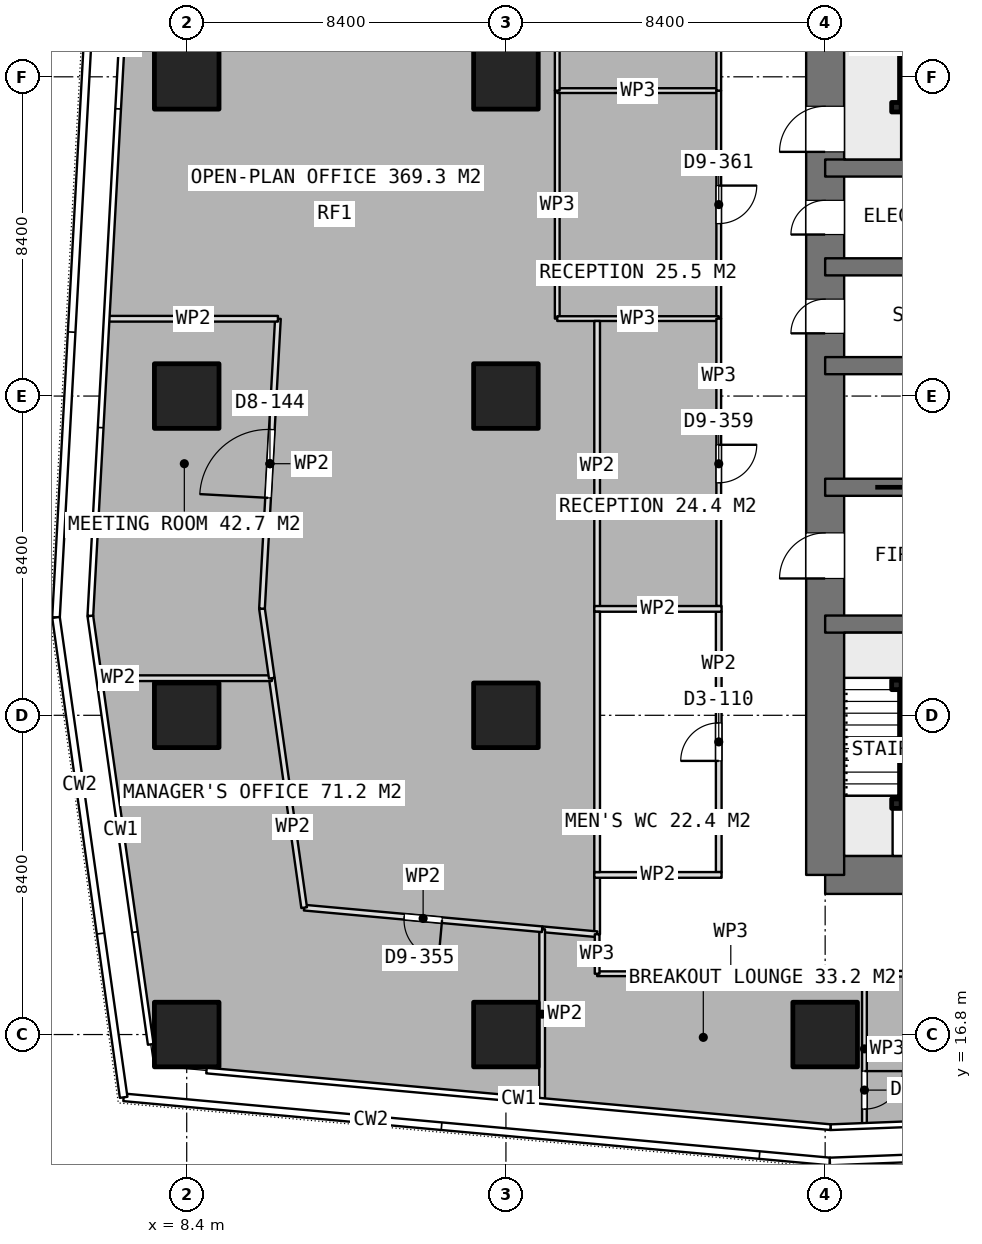
"""IFC4 building model, lengths in metres.
Left out: names, types, materials, properties, quantities, classifications, styles, units other than length and angle.
Written with IfcOpenShell. Run it as: python <this file> out.ifc"""

import sys

from ifc_helpers import new_model, si_unit, direction, frame, frame_2d, origin, origin_2d, place, context, subcontext, project, spatial, rectangle, extrude, element, fill, save


model = new_model("IFC4")
c1 = context("Model", 3, precision=1e-05, world=origin(), true_north=direction((0.0, 1.0)))
c2 = subcontext(c1, "Body", "Model", "MODEL_VIEW")
j1 = project(units=[si_unit("LENGTHUNIT", "METRE"), si_unit("PLANEANGLEUNIT", "RADIAN")], contexts=[c1])
p1 = place(None, origin())
s1 = spatial("IfcSite", under=j1, at=p1, CompositionType="ELEMENT")
p2 = place(p1, origin())
s2 = spatial("IfcBuilding", under=s1, at=p2, CompositionType="ELEMENT")
p3 = place(p2, frame((0.0, 0.0, 106.55)))
s3 = spatial("IfcBuildingStorey", under=s2, at=p3, CompositionType="ELEMENT", Elevation=106.55)
p4 = place(p3, frame((25.2, 21.0, 0.0), z_axis=(0.0, 0.0, 1.0), x_axis=(1.0, 0.0, 0.0)))
e1 = element("IfcWall", 1, at=p4, inside=s3, PredefinedType="SHEAR", context=c2, shape_type="SweptSolid", body=[
    extrude(rectangle(XDim=10.4, YDim=1.0, at=frame_2d((5.2, 0.0))), origin(), (0.0, 0.0, 1.0), 3.75),
])
p5 = place(p3, frame((25.2, 21.0, 0.0), z_axis=(0.0, 0.0, 1.0), x_axis=(0.0, 1.0, 0.0)))
e2 = element("IfcWall", 2, at=p5, inside=s3, PredefinedType="SHEAR", context=c2, shape_type="SweptSolid", body=[
    extrude(rectangle(XDim=25.2, YDim=1.0, at=frame_2d((12.6, 0.0))), origin(), (0.0, 0.0, 1.0), 3.75),
])
p6 = place(p5, frame((7.8, 0.0, 0.0)))
e3 = element("IfcOpeningElement", 3, at=p6, cuts=e2, PredefinedType="OPENING", context=c2, shape_type="SweptSolid", body=[
    extrude(rectangle(XDim=1.2, YDim=2.1, at=frame_2d((0.6, 1.05))), frame((0.0, 0.51, 0.0), z_axis=(0.0, -1.0, 0.0), x_axis=(1.0, 0.0, 0.0)), (0.0, 0.0, 1.0), 1.02),
])
p7 = place(p5, frame((14.25, 0.0, 0.0)))
e4 = element("IfcOpeningElement", 4, at=p7, cuts=e2, PredefinedType="OPENING", context=c2, shape_type="SweptSolid", body=[
    extrude(rectangle(XDim=0.9, YDim=2.1, at=frame_2d((0.45, 1.05))), frame((0.0, 0.51, 0.0), z_axis=(0.0, -1.0, 0.0), x_axis=(1.0, 0.0, 0.0)), (0.0, 0.0, 1.0), 1.02),
])
p8 = place(p5, frame((16.85, 0.0, 0.0)))
e5 = element("IfcOpeningElement", 5, at=p8, cuts=e2, PredefinedType="OPENING", context=c2, shape_type="SweptSolid", body=[
    extrude(rectangle(XDim=0.9, YDim=2.1, at=frame_2d((0.45, 1.05))), frame((0.0, 0.51, 0.0), z_axis=(0.0, -1.0, 0.0), x_axis=(1.0, 0.0, 0.0)), (0.0, 0.0, 1.0), 1.02),
])
p9 = place(p5, frame((19.025, 0.0, 0.0)))
e6 = element("IfcOpeningElement", 6, at=p9, cuts=e2, PredefinedType="OPENING", context=c2, shape_type="SweptSolid", body=[
    extrude(rectangle(XDim=1.2, YDim=2.1, at=frame_2d((0.6, 1.05))), frame((0.0, 0.51, 0.0), z_axis=(0.0, -1.0, 0.0), x_axis=(1.0, 0.0, 0.0)), (0.0, 0.0, 1.0), 1.02),
])
p10 = place(p3, frame((25.2, 27.6, 0.0), z_axis=(0.0, 0.0, 1.0), x_axis=(1.0, 0.0, 0.0)))
e7 = element("IfcWall", 7, at=p10, inside=s3, PredefinedType="SHEAR", context=c2, shape_type="SweptSolid", body=[
    extrude(rectangle(XDim=6.6, YDim=0.45, at=frame_2d((3.3, 0.0))), origin(), (0.0, 0.0, 1.0), 3.75),
])
p11 = place(p10, frame((4.975, 0.0, 0.0)))
e8 = element("IfcOpeningElement", 8, at=p11, cuts=e7, PredefinedType="OPENING", context=c2, shape_type="SweptSolid", body=[
    extrude(rectangle(XDim=1.2, YDim=2.1, at=frame_2d((0.6, 1.05))), frame((0.0, 0.235, 0.0), z_axis=(0.0, -1.0, 0.0), x_axis=(1.0, 0.0, 0.0)), (0.0, 0.0, 1.0), 0.47),
])
p12 = place(p3, frame((25.2, 31.2, 0.0), z_axis=(0.0, 0.0, 1.0), x_axis=(1.0, 0.0, 0.0)))
e9 = element("IfcWall", 9, at=p12, inside=s3, PredefinedType="SHEAR", context=c2, shape_type="SweptSolid", body=[
    extrude(rectangle(XDim=6.6, YDim=0.45, at=frame_2d((3.3, 0.0))), origin(), (0.0, 0.0, 1.0), 3.75),
])
p13 = place(p12, frame((2.65, 0.0, 0.0)))
e10 = element("IfcOpeningElement", 10, at=p13, cuts=e9, PredefinedType="OPENING", context=c2, shape_type="SweptSolid", body=[
    extrude(rectangle(XDim=1.3, YDim=2.1, at=frame_2d((0.65, 1.05))), frame((0.0, 0.235, 0.0), z_axis=(0.0, -1.0, 0.0), x_axis=(1.0, 0.0, 0.0)), (0.0, 0.0, 1.0), 0.47),
])
for number, where, z_axis, x_axis in (
    (11, (25.2, 34.4, 0.0), (0.0, 0.0, 1.0), (1.0, 0.0, 0.0)),
    (12, (25.2, 37.0, 0.0), (0.0, 0.0, 1.0), (1.0, 0.0, 0.0)),
    (13, (25.2, 39.6, 0.0), (0.0, 0.0, 1.0), (1.0, 0.0, 0.0)),
):
    element("IfcWall", number, at=place(p3, frame(where, z_axis=z_axis, x_axis=x_axis)), inside=s3, PredefinedType="SHEAR", context=c2, shape_type="SweptSolid", body=[
        extrude(rectangle(XDim=6.6, YDim=0.45, at=frame_2d((3.3, 0.0))), origin(), (0.0, 0.0, 1.0), 3.75),
    ])
for number, where, z_axis, x_axis in (
    (14, (8.4, 16.8, 0.0), (0.0, 0.0, 1.0), (1.0, 0.0, 0.0)),
    (15, (8.4, 25.2, 0.0), (0.0, 0.0, 1.0), (1.0, 0.0, 0.0)),
    (16, (8.4, 33.6, 0.0), (0.0, 0.0, 1.0), (1.0, 0.0, 0.0)),
    (17, (8.4, 42.0, 0.0), (0.0, 0.0, 1.0), (1.0, 0.0, 0.0)),
    (18, (16.8, 16.8, 0.0), (0.0, 0.0, 1.0), (1.0, 0.0, 0.0)),
    (19, (16.8, 25.2, 0.0), (0.0, 0.0, 1.0), (1.0, 0.0, 0.0)),
    (20, (16.8, 33.6, 0.0), (0.0, 0.0, 1.0), (1.0, 0.0, 0.0)),
    (21, (16.8, 42.0, 0.0), (0.0, 0.0, 1.0), (1.0, 0.0, 0.0)),
    (22, (25.2, 16.8, 0.0), (0.0, 0.0, 1.0), (1.0, 0.0, 0.0)),
):
    element("IfcColumn", number, at=place(p3, frame(where, z_axis=z_axis, x_axis=x_axis)), inside=s3, PredefinedType="COLUMN", context=c2, shape_type="SweptSolid", body=[
        extrude(rectangle(XDim=1.7, YDim=1.7, at=origin_2d()), origin(), (0.0, 0.0, 1.0), 3.75),
    ])
for number, where, z_axis, x_axis in (
    (23, (19.125, 21.0, 0.0), (0.0, 0.0, 1.0), (1.0, 0.0, 0.0)),
    (24, (19.125, 28.0, 0.0), (0.0, 0.0, 1.0), (1.0, 0.0, 0.0)),
):
    element("IfcWall", number, at=place(p3, frame(where, z_axis=z_axis, x_axis=x_axis)), inside=s3, PredefinedType="PARTITIONING", context=c2, shape_type="SweptSolid", body=[
        extrude(rectangle(XDim=3.35, YDim=0.15, at=frame_2d((1.675, 0.0))), origin(), (0.0, 0.0, 1.0), 3.5),
    ])
p14 = place(p3, frame((19.2, 21.075, 0.0), z_axis=(0.0, 0.0, 1.0), x_axis=(0.0, 1.0, 0.0)))
e25 = element("IfcWall", 25, at=p14, inside=s3, PredefinedType="PARTITIONING", context=c2, shape_type="SweptSolid", body=[
    extrude(rectangle(XDim=6.85, YDim=0.15, at=frame_2d((3.425, 0.0))), origin(), (0.0, 0.0, 1.0), 3.5),
])
p15 = place(p3, frame((22.4, 21.075, 0.0), z_axis=(0.0, 0.0, 1.0), x_axis=(0.0, 1.0, 0.0)))
e26 = element("IfcWall", 26, at=p15, inside=s3, PredefinedType="PARTITIONING", context=c2, shape_type="SweptSolid", body=[
    extrude(rectangle(XDim=6.85, YDim=0.15, at=frame_2d((3.425, 0.0))), origin(), (0.0, 0.0, 1.0), 3.5),
])
p16 = place(p15, frame((2.925, 0.0, 0.0)))
e27 = element("IfcOpeningElement", 27, at=p16, cuts=e26, PredefinedType="OPENING", context=c2, shape_type="SweptSolid", body=[
    extrude(rectangle(XDim=1.0, YDim=2.1, at=frame_2d((0.5, 1.05))), frame((0.0, 0.085, 0.0), z_axis=(0.0, -1.0, 0.0), x_axis=(1.0, 0.0, 0.0)), (0.0, 0.0, 1.0), 0.17),
])
p17 = place(p3, frame((18.15, 35.638, 0.0), z_axis=(0.0, 0.0, 1.0), x_axis=(0.0, 1.0, 0.0)))
e28 = element("IfcWall", 28, at=p17, inside=s3, PredefinedType="PARTITIONING", context=c2, shape_type="SweptSolid", body=[
    extrude(rectangle(XDim=5.999, YDim=0.125, at=frame_2d((3.0, 0.0))), origin(), (0.0, 0.0, 1.0), 3.5),
])
p18 = place(p3, frame((18.15, 41.637, 0.0), z_axis=(0.0, 0.0, 1.0), x_axis=(1.0, 0.0, 0.0)))
e29 = element("IfcWall", 29, at=p18, inside=s3, PredefinedType="PARTITIONING", context=c2, shape_type="SweptSolid", body=[
    extrude(rectangle(XDim=4.25, YDim=0.125, at=frame_2d((2.125, 0.0))), origin(), (0.0, 0.0, 1.0), 3.5),
])
p19 = place(p3, frame((22.4, 41.637, 0.0), z_axis=(0.0, 0.0, 1.0), x_axis=(0.0, -1.0, 0.0)))
e30 = element("IfcWall", 30, at=p19, inside=s3, PredefinedType="PARTITIONING", context=c2, shape_type="SweptSolid", body=[
    extrude(rectangle(XDim=5.999, YDim=0.125, at=frame_2d((3.0, 0.0))), origin(), (0.0, 0.0, 1.0), 3.5),
])
p20 = place(p19, frame((2.499, 0.0, 0.0)))
e31 = element("IfcOpeningElement", 31, at=p20, cuts=e30, PredefinedType="OPENING", context=c2, shape_type="SweptSolid", body=[
    extrude(rectangle(XDim=1.0, YDim=2.1, at=frame_2d((0.5, 1.05))), frame((0.0, 0.073, 0.0), z_axis=(0.0, -1.0, 0.0), x_axis=(1.0, 0.0, 0.0)), (0.0, 0.0, 1.0), 0.145),
])
p21 = place(p3, frame((22.4, 35.638, 0.0), z_axis=(0.0, 0.0, 1.0), x_axis=(-1.0, 0.0, 0.0)))
e32 = element("IfcWall", 32, at=p21, inside=s3, PredefinedType="PARTITIONING", context=c2, shape_type="SweptSolid", body=[
    extrude(rectangle(XDim=4.25, YDim=0.125, at=frame_2d((2.125, 0.0))), origin(), (0.0, 0.0, 1.0), 3.5),
])
for number, where, z_axis, x_axis in (
    (33, (18.15, 41.637, 0.0), (0.0, 0.0, 1.0), (0.0, 1.0, 0.0)),
    (34, (22.4, 44.637, 0.0), (0.0, 0.0, 1.0), (0.0, -1.0, 0.0)),
):
    element("IfcWall", number, at=place(p3, frame(where, z_axis=z_axis, x_axis=x_axis)), inside=s3, PredefinedType="PARTITIONING", context=c2, shape_type="SweptSolid", body=[
        extrude(rectangle(XDim=3.0, YDim=0.125, at=frame_2d((1.5, 0.0))), origin(), (0.0, 0.0, 1.0), 3.5),
    ])
p22 = place(p3, frame((19.2, 35.575, 0.0), z_axis=(0.0, 0.0, 1.0), x_axis=(0.0, -1.0, 0.0)))
e35 = element("IfcWall", 35, at=p22, inside=s3, PredefinedType="PARTITIONING", context=c2, shape_type="SweptSolid", body=[
    extrude(rectangle(XDim=7.65, YDim=0.15, at=frame_2d((3.825, 0.0))), origin(), (0.0, 0.0, 1.0), 3.5),
])
p23 = place(p3, frame((19.2, 21.075, 0.0), z_axis=(0.0, 0.0, 1.0), x_axis=(0.0, -1.0, 0.0)))
e36 = element("IfcWall", 36, at=p23, inside=s3, PredefinedType="PARTITIONING", context=c2, shape_type="SweptSolid", body=[
    extrude(rectangle(XDim=1.636, YDim=0.15, at=frame_2d((0.818, 0.0))), origin(), (0.0, 0.0, 1.0), 3.5),
])
p24 = place(p3, frame((19.2, 19.439, 0.0), z_axis=(0.0, 0.0, 1.0), x_axis=(-0.995920706464, 0.090232734836, 0.0)))
e37 = element("IfcWall", 37, at=p24, inside=s3, PredefinedType="PARTITIONING", context=c2, shape_type="SweptSolid", body=[
    extrude(rectangle(XDim=1.453, YDim=0.15, at=frame_2d((0.727, 0.0))), origin(), (0.0, 0.0, 1.0), 3.5),
])
p25 = place(p3, frame((17.753, 19.57, 0.0), z_axis=(0.0, 0.0, 1.0), x_axis=(0.0, -1.0, 0.0)))
e38 = element("IfcWall", 38, at=p25, inside=s3, PredefinedType="PARTITIONING", context=c2, shape_type="SweptSolid", body=[
    extrude(rectangle(XDim=4.468, YDim=0.15, at=frame_2d((2.234, 0.0))), origin(), (0.0, 0.0, 1.0), 3.5),
])
p26 = place(p3, frame((17.752, 19.57, 0.0), z_axis=(0.0, 0.0, 1.0), x_axis=(-0.995899251229, 0.090469229029, 0.0)))
e39 = element("IfcWall", 39, at=p26, inside=s3, PredefinedType="PARTITIONING", context=c2, shape_type="SweptSolid", body=[
    extrude(rectangle(XDim=6.288, YDim=0.15, at=frame_2d((3.144, 0.0))), origin(), (0.0, 0.0, 1.0), 3.5),
])
p27 = place(p26, frame((2.644, 0.0, 0.0)))
e40 = element("IfcOpeningElement", 40, at=p27, cuts=e39, PredefinedType="OPENING", context=c2, shape_type="SweptSolid", body=[
    extrude(rectangle(XDim=1.0, YDim=2.1, at=frame_2d((0.5, 1.05))), frame((0.0, 0.085, 0.0), z_axis=(0.0, -1.0, 0.0), x_axis=(1.0, 0.0, 0.0)), (0.0, 0.0, 1.0), 0.17),
])
p28 = place(p3, frame((11.49, 20.139, 0.0), z_axis=(0.0, 0.0, 1.0), x_axis=(-0.139593505482, 0.990208893733, 0.0)))
e41 = element("IfcWall", 41, at=p28, inside=s3, PredefinedType="PARTITIONING", context=c2, shape_type="SweptSolid", body=[
    extrude(rectangle(XDim=6.097, YDim=0.15, at=frame_2d((3.048, 0.0))), origin(), (0.0, 0.0, 1.0), 3.5),
])
p29 = place(p3, frame((10.639, 26.176, 0.0), z_axis=(0.0, 0.0, 1.0), x_axis=(-1.0, 0.0, 0.0)))
e42 = element("IfcWall", 42, at=p29, inside=s3, PredefinedType="PARTITIONING", context=c2, shape_type="SweptSolid", body=[
    extrude(rectangle(XDim=4.494, YDim=0.15, at=frame_2d((2.247, 0.0))), origin(), (0.0, 0.0, 1.0), 3.5),
])
p30 = place(p3, frame((10.639, 26.177, 0.0), z_axis=(0.0, 0.0, 1.0), x_axis=(-0.139570739539, 0.990212102867, 0.0)))
e43 = element("IfcWall", 43, at=p30, inside=s3, PredefinedType="PARTITIONING", context=c2, shape_type="SweptSolid", body=[
    extrude(rectangle(XDim=1.847, YDim=0.15, at=frame_2d((0.924, 0.0))), origin(), (0.0, 0.0, 1.0), 3.5),
])
p31 = place(p3, frame((10.381, 28.006, 0.0), z_axis=(0.0, 0.0, 1.0), x_axis=(0.054839895522, 0.998495160659, 0.0)))
e44 = element("IfcWall", 44, at=p31, inside=s3, PredefinedType="PARTITIONING", context=c2, shape_type="SweptSolid", body=[
    extrude(rectangle(XDim=7.639, YDim=0.15, at=frame_2d((3.82, 0.0))), origin(), (0.0, 0.0, 1.0), 3.5),
])
p32 = place(p31, frame((2.92, 0.0, 0.0)))
e45 = element("IfcOpeningElement", 45, at=p32, cuts=e44, PredefinedType="OPENING", context=c2, shape_type="SweptSolid", body=[
    extrude(rectangle(XDim=1.8, YDim=2.1, at=frame_2d((0.9, 1.05))), frame((0.0, 0.085, 0.0), z_axis=(0.0, -1.0, 0.0), x_axis=(1.0, 0.0, 0.0)), (0.0, 0.0, 1.0), 0.17),
])
p33 = place(p3, frame((10.8, 35.634, 0.0), z_axis=(0.0, 0.0, 1.0), x_axis=(-1.0, 0.0, 0.0)))
e46 = element("IfcWall", 46, at=p33, inside=s3, PredefinedType="PARTITIONING", context=c2, shape_type="SweptSolid", body=[
    extrude(rectangle(XDim=4.457, YDim=0.15, at=frame_2d((2.229, 0.0))), origin(), (0.0, 0.0, 1.0), 3.5),
])
p34 = place(p3, frame((19.2, 18.4, 0.0), z_axis=(0.0, 0.0, 1.0), x_axis=(1.0, 0.0, 0.0)))
e47 = element("IfcWall", 47, at=p34, inside=s3, PredefinedType="PARTITIONING", context=c2, shape_type="SweptSolid", body=[
    extrude(rectangle(XDim=7.034, YDim=0.125, at=frame_2d((3.517, 0.0))), origin(), (0.0, 0.0, 1.0), 3.5),
])
p35 = place(p3, frame((26.234, 18.4, 0.0), z_axis=(0.0, 0.0, 1.0), x_axis=(0.0, -1.0, 0.0)))
e48 = element("IfcWall", 48, at=p35, inside=s3, PredefinedType="PARTITIONING", context=c2, shape_type="SweptSolid", body=[
    extrude(rectangle(XDim=3.954, YDim=0.125, at=frame_2d((1.977, 0.0))), origin(), (0.0, 0.0, 1.0), 3.5),
])
p36 = place(p35, frame((2.562, 0.0, 0.0)))
e49 = element("IfcOpeningElement", 49, at=p36, cuts=e48, PredefinedType="OPENING", context=c2, shape_type="SweptSolid", body=[
    extrude(rectangle(XDim=1.0, YDim=2.1, at=frame_2d((0.5, 1.05))), frame((0.0, 0.073, 0.0), z_axis=(0.0, -1.0, 0.0), x_axis=(1.0, 0.0, 0.0)), (0.0, 0.0, 1.0), 0.145),
])
p37 = place(p3, frame((19.2, 19.439, 0.0), z_axis=(0.0, 0.0, 1.0), x_axis=(0.0, -1.0, 0.0)))
e50 = element("IfcWall", 50, at=p37, inside=s3, PredefinedType="PARTITIONING", context=c2, shape_type="SweptSolid", body=[
    extrude(rectangle(XDim=1.039, YDim=0.125, at=frame_2d((0.52, 0.0))), origin(), (0.0, 0.0, 1.0), 3.5),
])
p38 = place(p3, frame((22.4, 35.637, 0.0), z_axis=(0.0, 0.0, 1.0), x_axis=(0.0, -1.0, 0.0)))
e51 = element("IfcWall", 51, at=p38, inside=s3, PredefinedType="PARTITIONING", context=c2, shape_type="SweptSolid", body=[
    extrude(rectangle(XDim=7.562, YDim=0.125, at=frame_2d((3.781, 0.0))), origin(), (0.0, 0.0, 1.0), 3.5),
])
p39 = place(p38, frame((3.319, 0.0, 0.0)))
e52 = element("IfcOpeningElement", 52, at=p39, cuts=e51, PredefinedType="OPENING", context=c2, shape_type="SweptSolid", body=[
    extrude(rectangle(XDim=1.0, YDim=2.1, at=frame_2d((0.5, 1.05))), frame((0.0, 0.073, 0.0), z_axis=(0.0, -1.0, 0.0), x_axis=(1.0, 0.0, 0.0)), (0.0, 0.0, 1.0), 0.145),
])
p40 = place(p3, frame((26.234, 18.4, 0.0), z_axis=(0.0, 0.0, 1.0), x_axis=(1.0, 0.0, 0.0)))
e53 = element("IfcWall", 53, at=p40, inside=s3, PredefinedType="PARTITIONING", context=c2, shape_type="SweptSolid", body=[
    extrude(rectangle(XDim=23.702, YDim=0.15, at=frame_2d((11.851, 0.0))), origin(), (0.0, 0.0, 1.0), 3.5),
])
p41 = place(p40, frame((11.351, 0.0, 0.0)))
e54 = element("IfcOpeningElement", 54, at=p41, cuts=e53, PredefinedType="OPENING", context=c2, shape_type="SweptSolid", body=[
    extrude(rectangle(XDim=1.0, YDim=2.1, at=frame_2d((0.5, 1.05))), frame((0.0, 0.085, 0.0), z_axis=(0.0, -1.0, 0.0), x_axis=(1.0, 0.0, 0.0)), (0.0, 0.0, 1.0), 0.17),
])
for number, where, z_axis, x_axis in (
    (55, (27.075, 22.875, 0.0), (0.0, 0.0, 1.0), (1.0, 0.0, 0.0)),
    (56, (27.075, 26.0, 0.0), (0.0, 0.0, 1.0), (1.0, 0.0, 0.0)),
    (57, (27.075, 41.2, 0.0), (0.0, 0.0, 1.0), (1.0, 0.0, 0.0)),
):
    element("IfcColumn", number, at=place(p3, frame(where, z_axis=z_axis, x_axis=x_axis)), inside=s3, PredefinedType="COLUMN", context=c2, shape_type="SweptSolid", body=[
        extrude(rectangle(XDim=0.25, YDim=0.25, at=origin_2d()), origin(), (0.0, 0.0, 1.0), 3.75),
    ])
p42 = place(p6, origin())
e58 = element("IfcDoor", 58, at=p42, inside=s3, OperationType="SINGLE_SWING_LEFT", PredefinedType="DOOR", context=c2, shape_type="SweptSolid", body=[
    extrude(rectangle(XDim=1.2, YDim=2.1, at=frame_2d((0.6, 1.05))), frame((0.0, 0.025, 0.0), z_axis=(0.0, -1.0, 0.0), x_axis=(1.0, 0.0, 0.0)), (0.0, 0.0, 1.0), 0.05),
])
fill(e3, e58)
p43 = place(p7, origin())
e59 = element("IfcDoor", 59, at=p43, inside=s3, OperationType="SINGLE_SWING_LEFT", PredefinedType="DOOR", context=c2, shape_type="SweptSolid", body=[
    extrude(rectangle(XDim=0.9, YDim=2.1, at=frame_2d((0.45, 1.05))), frame((0.0, 0.025, 0.0), z_axis=(0.0, -1.0, 0.0), x_axis=(1.0, 0.0, 0.0)), (0.0, 0.0, 1.0), 0.05),
])
fill(e4, e59)
p44 = place(p8, origin())
e60 = element("IfcDoor", 60, at=p44, inside=s3, OperationType="SINGLE_SWING_LEFT", PredefinedType="DOOR", context=c2, shape_type="SweptSolid", body=[
    extrude(rectangle(XDim=0.9, YDim=2.1, at=frame_2d((0.45, 1.05))), frame((0.0, 0.025, 0.0), z_axis=(0.0, -1.0, 0.0), x_axis=(1.0, 0.0, 0.0)), (0.0, 0.0, 1.0), 0.05),
])
fill(e5, e60)
p45 = place(p16, origin())
e61 = element("IfcDoor", 61, at=p45, inside=s3, OperationType="SINGLE_SWING_LEFT", PredefinedType="DOOR", context=c2, shape_type="SweptSolid", body=[
    extrude(rectangle(XDim=1.0, YDim=2.1, at=frame_2d((0.5, 1.05))), frame((0.0, 0.025, 0.0), z_axis=(0.0, -1.0, 0.0), x_axis=(1.0, 0.0, 0.0)), (0.0, 0.0, 1.0), 0.05),
])
fill(e27, e61)
p46 = place(p20, origin())
e62 = element("IfcDoor", 62, at=p46, inside=s3, OperationType="SINGLE_SWING_LEFT", PredefinedType="DOOR", context=c2, shape_type="SweptSolid", body=[
    extrude(rectangle(XDim=1.0, YDim=2.1, at=frame_2d((0.5, 1.05))), frame((0.0, 0.025, 0.0), z_axis=(0.0, -1.0, 0.0), x_axis=(1.0, 0.0, 0.0)), (0.0, 0.0, 1.0), 0.05),
])
fill(e31, e62)
p47 = place(p32, origin())
e63 = element("IfcDoor", 63, at=p47, inside=s3, OperationType="DOUBLE_DOOR_SINGLE_SWING", PredefinedType="DOOR", context=c2, shape_type="SweptSolid", body=[
    extrude(rectangle(XDim=1.8, YDim=2.1, at=frame_2d((0.9, 1.05))), frame((0.0, 0.025, 0.0), z_axis=(0.0, -1.0, 0.0), x_axis=(1.0, 0.0, 0.0)), (0.0, 0.0, 1.0), 0.05),
])
fill(e45, e63)
p48 = place(p27, origin())
e64 = element("IfcDoor", 64, at=p48, inside=s3, OperationType="SINGLE_SWING_LEFT", PredefinedType="DOOR", context=c2, shape_type="SweptSolid", body=[
    extrude(rectangle(XDim=1.0, YDim=2.1, at=frame_2d((0.5, 1.05))), frame((0.0, 0.025, 0.0), z_axis=(0.0, -1.0, 0.0), x_axis=(1.0, 0.0, 0.0)), (0.0, 0.0, 1.0), 0.05),
])
fill(e40, e64)
p49 = place(p36, origin())
e65 = element("IfcDoor", 65, at=p49, inside=s3, OperationType="SINGLE_SWING_LEFT", PredefinedType="DOOR", context=c2, shape_type="SweptSolid", body=[
    extrude(rectangle(XDim=1.0, YDim=2.1, at=frame_2d((0.5, 1.05))), frame((0.0, 0.025, 0.0), z_axis=(0.0, -1.0, 0.0), x_axis=(1.0, 0.0, 0.0)), (0.0, 0.0, 1.0), 0.05),
])
fill(e49, e65)
p50 = place(p39, origin())
e66 = element("IfcDoor", 66, at=p50, inside=s3, OperationType="SINGLE_SWING_LEFT", PredefinedType="DOOR", context=c2, shape_type="SweptSolid", body=[
    extrude(rectangle(XDim=1.0, YDim=2.1, at=frame_2d((0.5, 1.05))), frame((0.0, 0.025, 0.0), z_axis=(0.0, -1.0, 0.0), x_axis=(1.0, 0.0, 0.0)), (0.0, 0.0, 1.0), 0.05),
])
fill(e52, e66)
p51 = place(p9, origin())
e67 = element("IfcDoor", 67, at=p51, inside=s3, OperationType="SINGLE_SWING_RIGHT", PredefinedType="DOOR", context=c2, shape_type="SweptSolid", body=[
    extrude(rectangle(XDim=1.2, YDim=2.1, at=frame_2d((0.6, 1.05))), frame((0.0, 0.025, 0.0), z_axis=(0.0, -1.0, 0.0), x_axis=(1.0, 0.0, 0.0)), (0.0, 0.0, 1.0), 0.05),
])
fill(e6, e67)
save(model, sys.argv[1])
